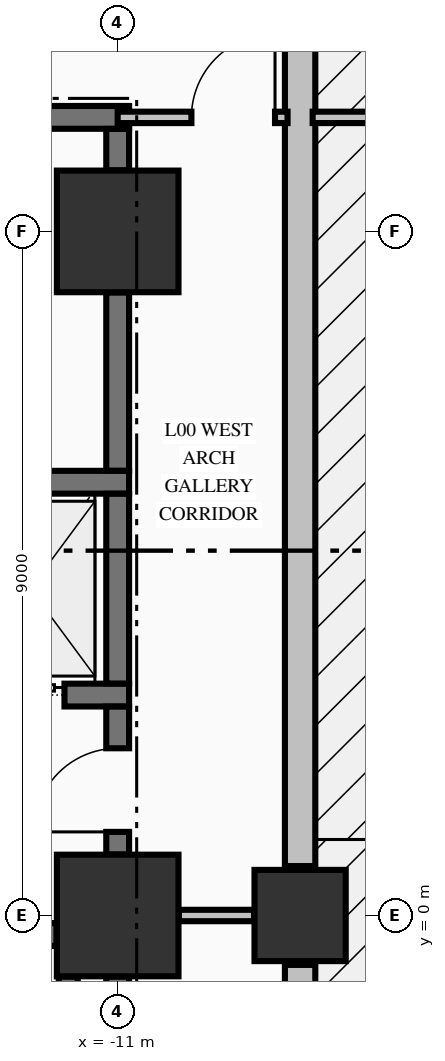
"""IFC4 building model, lengths in metres.
Left out: names, types, materials, properties, quantities, classifications, styles, units other than length and angle.
Written with IfcOpenShell. Run it as: python <this file> out.ifc"""

import sys

from ifc_helpers import new_model, si_unit, direction, frame, frame_2d, origin, origin_2d, place, context, subcontext, project, spatial, rectangle, extrude, element, fill, save


model = new_model("IFC4")
c1 = context("Model", 3, precision=1e-05, world=origin(), true_north=direction((0.0, 1.0)))
c2 = subcontext(c1, "Body", "Model", "MODEL_VIEW")
j1 = project(units=[si_unit("LENGTHUNIT", "METRE"), si_unit("PLANEANGLEUNIT", "RADIAN")], contexts=[c1])
p1 = place(None, origin())
s1 = spatial("IfcSite", under=j1, at=p1, CompositionType="ELEMENT")
p2 = place(p1, origin())
s2 = spatial("IfcBuilding", under=s1, at=p2, CompositionType="ELEMENT")
p3 = place(p2, origin())
s3 = spatial("IfcBuildingStorey", under=s2, at=p3, CompositionType="ELEMENT", Elevation=0.0)
for number, where, z_axis, x_axis in (
    (1, (-11.0, 0.0, 0.0), (0.0, 0.0, 1.0), (1.0, 0.0, 0.0)),
    (2, (-11.0, 9.0, 0.0), (0.0, 0.0, 1.0), (1.0, 0.0, 0.0)),
):
    element("IfcColumn", number, at=place(p3, frame(where, z_axis=z_axis, x_axis=x_axis)), inside=s3, PredefinedType="COLUMN", context=c2, shape_type="SweptSolid", body=[
        extrude(rectangle(XDim=1.6, YDim=1.6, at=origin_2d()), origin(), (0.0, 0.0, 1.0), 5.09),
    ])
p4 = place(p3, frame((-8.6, 0.0, 0.0), z_axis=(0.0, 0.0, 1.0), x_axis=(1.0, 0.0, 0.0)))
e3 = element("IfcColumn", 3, at=p4, inside=s3, PredefinedType="COLUMN", context=c2, shape_type="SweptSolid", body=[
    extrude(rectangle(XDim=1.2, YDim=1.2, at=origin_2d()), origin(), (0.0, 0.0, 1.0), 5.09),
])
p5 = place(p3, frame((-8.6, -25.35, 0.0), z_axis=(0.0, 0.0, 1.0), x_axis=(0.0, 1.0, 0.0)))
e4 = element("IfcWall", 4, at=p5, inside=s3, PredefinedType="STANDARD", context=c2, shape_type="SweptSolid", body=[
    extrude(rectangle(XDim=24.7, YDim=0.4, at=frame_2d((12.35, 0.0))), origin(), (0.0, 0.0, 1.0), 4.132),
])
p6 = place(p5, frame((10.5, 0.0, 0.0)))
e5 = element("IfcOpeningElement", 5, at=p6, cuts=e4, PredefinedType="OPENING", context=c2, shape_type="SweptSolid", body=[
    extrude(rectangle(XDim=2.4, YDim=2.6, at=frame_2d((1.2, 1.3))), frame((0.0, 0.21, 0.0), z_axis=(0.0, -1.0, 0.0), x_axis=(1.0, 0.0, 0.0)), (0.0, 0.0, 1.0), 0.42),
])
p7 = place(p3, frame((-8.6, 0.65, 0.0), z_axis=(0.0, 0.0, 1.0), x_axis=(0.0, 1.0, 0.0)))
e6 = element("IfcWall", 6, at=p7, inside=s3, PredefinedType="STANDARD", context=c2, shape_type="SweptSolid", body=[
    extrude(rectangle(XDim=14.7, YDim=0.4, at=frame_2d((7.35, 0.0))), origin(), (0.0, 0.0, 1.0), 4.132),
])
p8 = place(p3, frame((-19.196, -0.25, 0.0), z_axis=(0.0, 0.0, 1.0), x_axis=(1.0, 0.0, 0.0)))
e7 = element("IfcWall", 7, at=p8, inside=s3, PredefinedType="SHEAR", context=c2, shape_type="SweptSolid", body=[
    extrude(rectangle(XDim=7.392, YDim=0.3, at=frame_2d((3.696, 0.0))), origin(), (0.0, 0.0, 1.0), 5.09),
])
p9 = place(p8, frame((5.496, 0.0, 0.0)))
e8 = element("IfcOpeningElement", 8, at=p9, cuts=e7, PredefinedType="OPENING", context=c2, shape_type="SweptSolid", body=[
    extrude(rectangle(XDim=1.1, YDim=2.15, at=frame_2d((0.55, 1.075))), frame((0.0, 0.16, 0.0), z_axis=(0.0, -1.0, 0.0), x_axis=(1.0, 0.0, 0.0)), (0.0, 0.0, 1.0), 0.32),
])
p10 = place(p3, frame((-14.875, 2.9, 0.0), z_axis=(0.0, 0.0, 1.0), x_axis=(1.0, 0.0, 0.0)))
e9 = element("IfcWall", 9, at=p10, inside=s3, PredefinedType="SHEAR", context=c2, shape_type="SweptSolid", body=[
    extrude(rectangle(XDim=4.025, YDim=0.3, at=frame_2d((2.012, 0.0))), origin(), (0.0, 0.0, 1.0), 5.09),
])
p11 = place(p10, frame((2.075, 0.0, 0.0)))
e10 = element("IfcOpeningElement", 10, at=p11, cuts=e9, PredefinedType="OPENING", context=c2, shape_type="SweptSolid", body=[
    extrude(rectangle(XDim=1.1, YDim=2.2, at=frame_2d((0.55, 1.1))), frame((0.0, 0.16, 0.0), z_axis=(0.0, -1.0, 0.0), x_axis=(1.0, 0.0, 0.0)), (0.0, 0.0, 1.0), 0.32),
])
p12 = place(p3, frame((-14.875, 5.7, 0.0), z_axis=(0.0, 0.0, 1.0), x_axis=(1.0, 0.0, 0.0)))
e11 = element("IfcWall", 11, at=p12, inside=s3, PredefinedType="SHEAR", context=c2, shape_type="SweptSolid", body=[
    extrude(rectangle(XDim=4.025, YDim=0.3, at=frame_2d((2.012, 0.0))), origin(), (0.0, 0.0, 1.0), 5.09),
])
p13 = place(p3, frame((-14.7, 10.5, 0.0), z_axis=(0.0, 0.0, 1.0), x_axis=(1.0, 0.0, 0.0)))
e12 = element("IfcWall", 12, at=p13, inside=s3, PredefinedType="SHEAR", context=c2, shape_type="SweptSolid", body=[
    extrude(rectangle(XDim=3.85, YDim=0.3, at=frame_2d((1.925, 0.0))), origin(), (0.0, 0.0, 1.0), 5.09),
])
p14 = place(p13, frame((0.775, 0.0, 0.0)))
e13 = element("IfcOpeningElement", 13, at=p14, cuts=e12, PredefinedType="OPENING", context=c2, shape_type="SweptSolid", body=[
    extrude(rectangle(XDim=0.95, YDim=2.15, at=frame_2d((0.475, 1.075))), frame((0.0, 0.16, 0.0), z_axis=(0.0, -1.0, 0.0), x_axis=(1.0, 0.0, 0.0)), (0.0, 0.0, 1.0), 0.32),
])
p15 = place(p3, frame((-10.194, 0.0, 0.0), z_axis=(0.0, 0.0, 1.0), x_axis=(1.0, 0.0, 0.0)))
e14 = element("IfcWall", 14, at=p15, inside=s3, PredefinedType="PARTITIONING", context=c2, shape_type="SweptSolid", body=[
    extrude(rectangle(XDim=0.988, YDim=0.15, at=frame_2d((0.494, 0.0))), origin(), (0.0, 0.0, 1.0), 4.132),
])
p16 = place(p3, frame((-11.0, 10.5, 0.0), z_axis=(0.0, 0.0, 1.0), x_axis=(1.0, 0.0, 0.0)))
e15 = element("IfcWall", 15, at=p16, inside=s3, PredefinedType="PARTITIONING", context=c2, shape_type="SweptSolid", body=[
    extrude(rectangle(XDim=2.235, YDim=0.15, at=frame_2d((1.118, 0.0))), origin(), (0.0, 0.0, 1.0), 5.09),
])
p17 = place(p16, frame((0.97, 0.0, 0.0)))
e16 = element("IfcOpeningElement", 16, at=p17, cuts=e15, PredefinedType="OPENING", context=c2, shape_type="SweptSolid", body=[
    extrude(rectangle(XDim=1.1, YDim=2.15, at=frame_2d((0.55, 1.075))), frame((0.0, 0.085, 0.0), z_axis=(0.0, -1.0, 0.0), x_axis=(1.0, 0.0, 0.0)), (0.0, 0.0, 1.0), 0.17),
])
p18 = place(p3, frame((-8.435, 10.5, 0.0), z_axis=(0.0, 0.0, 1.0), x_axis=(1.0, 0.0, 0.0)))
e17 = element("IfcWall", 17, at=p18, inside=s3, PredefinedType="PARTITIONING", context=c2, shape_type="SweptSolid", body=[
    extrude(rectangle(XDim=16.87, YDim=0.15, at=frame_2d((8.435, 0.0))), origin(), (0.0, 0.0, 1.0), 5.09),
])
p19 = place(p18, frame((7.735, 0.0, 0.0)))
e18 = element("IfcOpeningElement", 18, at=p19, cuts=e17, PredefinedType="OPENING", context=c2, shape_type="SweptSolid", body=[
    extrude(rectangle(XDim=1.4, YDim=2.2, at=frame_2d((0.7, 1.1))), frame((0.0, 0.085, 0.0), z_axis=(0.0, -1.0, 0.0), x_axis=(1.0, 0.0, 0.0)), (0.0, 0.0, 1.0), 0.17),
])
p20 = place(p3, frame((-11.65, -8.196, 0.0), z_axis=(0.0, 0.0, 1.0), x_axis=(0.0, 1.0, 0.0)))
e19 = element("IfcWall", 19, at=p20, inside=s3, PredefinedType="SOLIDWALL", context=c2, shape_type="SweptSolid", body=[
    extrude(rectangle(XDim=7.392, YDim=0.25, at=frame_2d((3.696, 0.0))), origin(), (0.0, 0.0, 1.0), 5.09),
])
p21 = place(p3, frame((-11.0, -8.196, 0.0), z_axis=(0.0, 0.0, 1.0), x_axis=(0.0, 1.0, 0.0)))
e20 = element("IfcWall", 20, at=p21, inside=s3, PredefinedType="SHEAR", context=c2, shape_type="SweptSolid", body=[
    extrude(rectangle(XDim=7.392, YDim=0.3, at=frame_2d((3.696, 0.0))), origin(), (0.0, 0.0, 1.0), 5.09),
])
p22 = place(p3, frame((-11.0, 0.804, 0.0), z_axis=(0.0, 0.0, 1.0), x_axis=(0.0, 1.0, 0.0)))
e21 = element("IfcWall", 21, at=p22, inside=s3, PredefinedType="SHEAR", context=c2, shape_type="SweptSolid", body=[
    extrude(rectangle(XDim=1.944, YDim=0.3, at=frame_2d((0.972, 0.0))), origin(), (0.0, 0.0, 1.0), 5.09),
])
p23 = place(p22, frame((0.296, 0.0, 0.0)))
e22 = element("IfcOpeningElement", 22, at=p23, cuts=e21, PredefinedType="OPENING", context=c2, shape_type="SweptSolid", body=[
    extrude(rectangle(XDim=1.1, YDim=2.15, at=frame_2d((0.55, 1.075))), frame((0.0, 0.16, 0.0), z_axis=(0.0, -1.0, 0.0), x_axis=(1.0, 0.0, 0.0)), (0.0, 0.0, 1.0), 0.32),
])
p24 = place(p3, frame((-11.0, 3.052, 0.0), z_axis=(0.0, 0.0, 1.0), x_axis=(0.0, 1.0, 0.0)))
e23 = element("IfcWall", 23, at=p24, inside=s3, PredefinedType="SHEAR", context=c2, shape_type="SweptSolid", body=[
    extrude(rectangle(XDim=2.496, YDim=0.3, at=frame_2d((1.248, 0.0))), origin(), (0.0, 0.0, 1.0), 5.09),
])
p25 = place(p3, frame((-11.0, 5.852, 0.0), z_axis=(0.0, 0.0, 1.0), x_axis=(0.0, 1.0, 0.0)))
e24 = element("IfcWall", 24, at=p25, inside=s3, PredefinedType="SHEAR", context=c2, shape_type="SweptSolid", body=[
    extrude(rectangle(XDim=2.344, YDim=0.3, at=frame_2d((1.172, 0.0))), origin(), (0.0, 0.0, 1.0), 5.09),
])
p26 = place(p3, frame((-11.0, 9.804, 0.0), z_axis=(0.0, 0.0, 1.0), x_axis=(0.0, 1.0, 0.0)))
e25 = element("IfcWall", 25, at=p26, inside=s3, PredefinedType="SHEAR", context=c2, shape_type="SweptSolid", body=[
    extrude(rectangle(XDim=0.544, YDim=0.3, at=frame_2d((0.272, 0.0))), origin(), (0.0, 0.0, 1.0), 5.09),
])
p27 = place(p23, origin())
e26 = element("IfcDoor", 26, at=p27, inside=s3, OperationType="SINGLE_SWING_LEFT", PredefinedType="DOOR", context=c2, shape_type="SweptSolid", body=[
    extrude(rectangle(XDim=1.1, YDim=2.15, at=frame_2d((0.55, 1.075))), frame((0.0, 0.025, 0.0), z_axis=(0.0, -1.0, 0.0), x_axis=(1.0, 0.0, 0.0)), (0.0, 0.0, 1.0), 0.05),
])
fill(e22, e26)
p28 = place(p11, origin())
e27 = element("IfcDoor", 27, at=p28, inside=s3, OperationType="SLIDING_TO_LEFT", PredefinedType="DOOR", context=c2, shape_type="SweptSolid", body=[
    extrude(rectangle(XDim=1.1, YDim=2.2, at=frame_2d((0.55, 1.1))), frame((0.0, 0.025, 0.0), z_axis=(0.0, -1.0, 0.0), x_axis=(1.0, 0.0, 0.0)), (0.0, 0.0, 1.0), 0.05),
])
fill(e10, e27)
p29 = place(p17, origin())
e28 = element("IfcDoor", 28, at=p29, inside=s3, OperationType="SINGLE_SWING_RIGHT", PredefinedType="DOOR", context=c2, shape_type="SweptSolid", body=[
    extrude(rectangle(XDim=1.1, YDim=2.15, at=frame_2d((0.55, 1.075))), frame((0.0, 0.025, 0.0), z_axis=(0.0, -1.0, 0.0), x_axis=(1.0, 0.0, 0.0)), (0.0, 0.0, 1.0), 0.05),
])
fill(e16, e28)
save(model, sys.argv[1])
